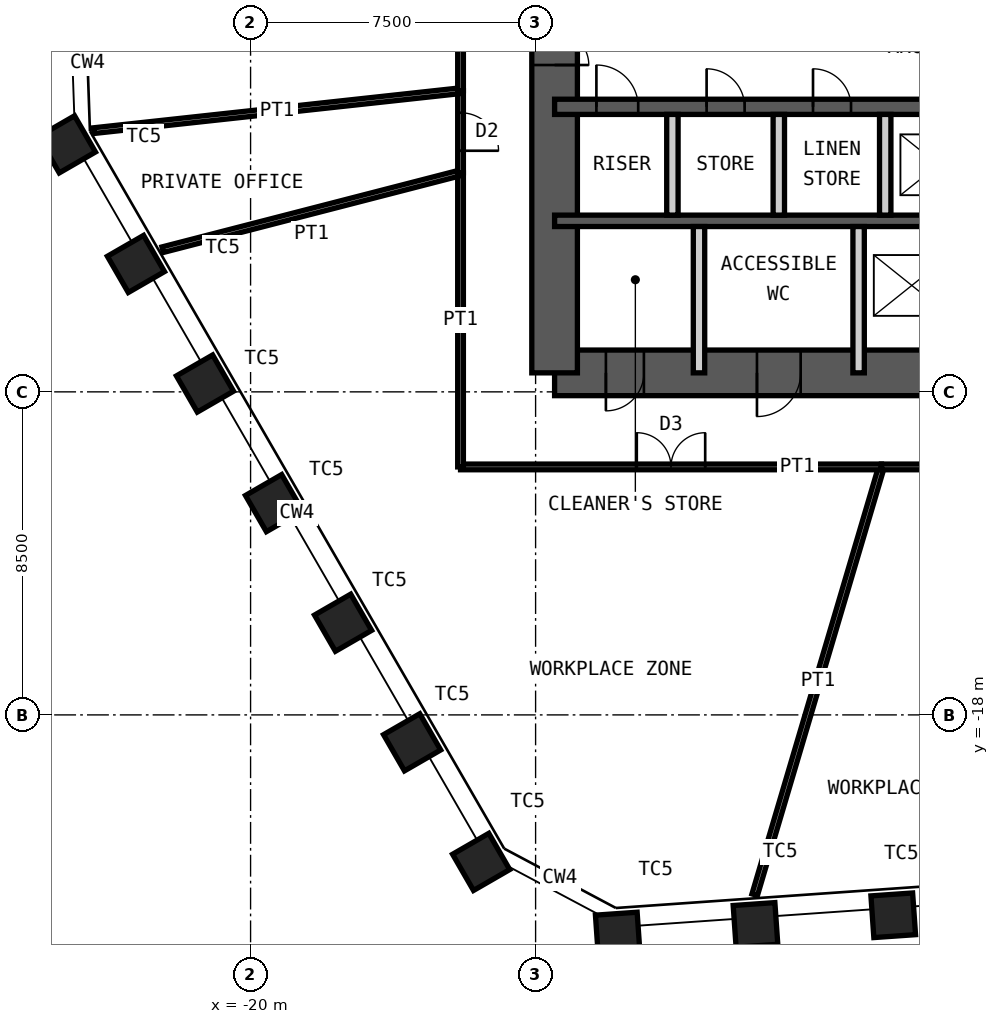
"""IFC4 building model, lengths in metres.
Left out: names, types, materials, properties, quantities, classifications, styles, units other than length and angle.
Written with IfcOpenShell. Run it as: python <this file> out.ifc"""

import sys

from ifc_helpers import new_model, si_unit, direction, frame, frame_2d, origin, origin_2d, place, context, subcontext, project, spatial, rectangle, hollow_rectangle, extrude, element, fill, save


model = new_model("IFC4")
c1 = context("Model", 3, precision=1e-05, world=origin(), true_north=direction((0.0, 1.0)))
c2 = subcontext(c1, "Body", "Model", "MODEL_VIEW")
j1 = project(units=[si_unit("LENGTHUNIT", "METRE"), si_unit("PLANEANGLEUNIT", "RADIAN")], contexts=[c1])
p1 = place(None, origin())
s1 = spatial("IfcSite", under=j1, at=p1, CompositionType="ELEMENT")
p2 = place(p1, origin())
s2 = spatial("IfcBuilding", under=s1, at=p2, CompositionType="ELEMENT")
p3 = place(p2, frame((0.0, 0.0, 209.8)))
s3 = spatial("IfcBuildingStorey", under=s2, at=p3, CompositionType="ELEMENT", Elevation=209.8)
for number, where, z_axis, x_axis in (
    (1, (-3.089, -23.272, 0.0), (0.0, 0.0, 1.0), (0.998, 0.07, 0.0)),
    (2, (-6.714, -23.526, 0.0), (0.0, 0.0, 1.0), (0.998, 0.07, 0.0)),
    (3, (-10.338, -23.779, 0.0), (0.0, 0.0, 1.0), (0.998, 0.07, 0.0)),
    (4, (-13.933, -21.868, 0.0), (0.0, 0.0, 1.0), (0.5, -0.866, 0.0)),
    (5, (-15.749, -18.721, 0.0), (0.0, 0.0, 1.0), (0.5, -0.866, 0.0)),
    (6, (-17.566, -15.574, 0.0), (0.0, 0.0, 1.0), (0.5, -0.866, 0.0)),
    (7, (-19.383, -12.428, 0.0), (0.0, 0.0, 1.0), (0.5, -0.866, 0.0)),
    (8, (-21.2, -9.281, 0.0), (0.0, 0.0, 1.0), (0.5, -0.866, 0.0)),
    (9, (-23.016, -6.134, 0.0), (0.0, 0.0, 1.0), (0.5, -0.866, 0.0)),
    (10, (-24.833, -2.988, 0.0), (0.0, 0.0, 1.0), (0.5, -0.866, 0.0)),
):
    element("IfcColumn", number, at=place(p3, frame(where, z_axis=z_axis, x_axis=x_axis)), inside=s3, PredefinedType="COLUMN", context=c2, shape_type="SweptSolid", body=[
        extrude(hollow_rectangle(XDim=1.1, YDim=1.1, WallThickness=0.07, at=origin_2d()), origin(), (0.0, 0.0, 1.0), 4.2),
    ])
p4 = place(p3, frame((-12.0, -9.0, 0.0), z_axis=(0.0, 0.0, 1.0), x_axis=(1.0, 0.0, 0.0)))
e11 = element("IfcWall", 11, at=p4, inside=s3, PredefinedType="SHEAR", context=c2, shape_type="SweptSolid", body=[
    extrude(rectangle(XDim=24.0, YDim=1.2, at=frame_2d((12.0, 0.0))), origin(), (0.0, 0.0, 1.0), 4.2),
])
p5 = place(p4, frame((1.35, 0.0, 0.0)))
e12 = element("IfcOpeningElement", 12, at=p5, cuts=e11, PredefinedType="OPENING", context=c2, shape_type="SweptSolid", body=[
    extrude(rectangle(XDim=1.0, YDim=2.1, at=frame_2d((0.5, 1.05))), frame((0.0, 0.61, 0.0), z_axis=(0.0, -1.0, 0.0), x_axis=(1.0, 0.0, 0.0)), (0.0, 0.0, 1.0), 1.22),
])
p6 = place(p4, frame((5.325, 0.0, 0.0)))
e13 = element("IfcOpeningElement", 13, at=p6, cuts=e11, PredefinedType="OPENING", context=c2, shape_type="SweptSolid", body=[
    extrude(rectangle(XDim=1.15, YDim=2.1, at=frame_2d((0.575, 1.05))), frame((0.0, 0.61, 0.0), z_axis=(0.0, -1.0, 0.0), x_axis=(1.0, 0.0, 0.0)), (0.0, 0.0, 1.0), 1.22),
])
p7 = place(p4, frame((12.6, 0.0, 0.0)))
e14 = element("IfcOpeningElement", 14, at=p7, cuts=e11, PredefinedType="OPENING", context=c2, shape_type="SweptSolid", body=[
    extrude(rectangle(XDim=1.0, YDim=2.1, at=frame_2d((0.5, 1.05))), frame((0.0, 0.61, 0.0), z_axis=(0.0, -1.0, 0.0), x_axis=(1.0, 0.0, 0.0)), (0.0, 0.0, 1.0), 1.22),
])
p8 = place(p3, frame((-12.0, -9.0, 0.0), z_axis=(0.0, 0.0, 1.0), x_axis=(0.0, 1.0, 0.0)))
e15 = element("IfcWall", 15, at=p8, inside=s3, PredefinedType="SHEAR", context=c2, shape_type="SweptSolid", body=[
    extrude(rectangle(XDim=18.0, YDim=1.2, at=frame_2d((9.0, 0.0))), origin(), (0.0, 0.0, 1.0), 4.2),
])
p9 = place(p8, frame((8.1, 0.0, 0.0)))
e16 = element("IfcOpeningElement", 16, at=p9, cuts=e15, PredefinedType="OPENING", context=c2, shape_type="SweptSolid", body=[
    extrude(rectangle(XDim=1.8, YDim=2.1, at=frame_2d((0.9, 1.05))), frame((0.0, 0.61, 0.0), z_axis=(0.0, -1.0, 0.0), x_axis=(1.0, 0.0, 0.0)), (0.0, 0.0, 1.0), 1.22),
])
p10 = place(p3, frame((-12.0, -2.0, 0.0), z_axis=(0.0, 0.0, 1.0), x_axis=(1.0, 0.0, 0.0)))
e17 = element("IfcWall", 17, at=p10, inside=s3, PredefinedType="SHEAR", context=c2, shape_type="SweptSolid", body=[
    extrude(rectangle(XDim=24.0, YDim=0.4, at=frame_2d((12.0, 0.0))), origin(), (0.0, 0.0, 1.0), 4.2),
])
p11 = place(p10, frame((1.1, 0.0, 0.0)))
e18 = element("IfcOpeningElement", 18, at=p11, cuts=e17, PredefinedType="OPENING", context=c2, shape_type="SweptSolid", body=[
    extrude(rectangle(XDim=1.1, YDim=2.1, at=frame_2d((0.55, 1.05))), frame((0.0, 0.21, 0.0), z_axis=(0.0, -1.0, 0.0), x_axis=(1.0, 0.0, 0.0)), (0.0, 0.0, 1.0), 0.42),
])
p12 = place(p10, frame((13.55, 0.0, 0.0)))
e19 = element("IfcOpeningElement", 19, at=p12, cuts=e17, PredefinedType="OPENING", context=c2, shape_type="SweptSolid", body=[
    extrude(rectangle(XDim=1.1, YDim=2.1, at=frame_2d((0.55, 1.05))), frame((0.0, 0.21, 0.0), z_axis=(0.0, -1.0, 0.0), x_axis=(1.0, 0.0, 0.0)), (0.0, 0.0, 1.0), 0.42),
])
p13 = place(p10, frame((20.7, 0.0, 0.0)))
e20 = element("IfcOpeningElement", 20, at=p13, cuts=e17, PredefinedType="OPENING", context=c2, shape_type="SweptSolid", body=[
    extrude(rectangle(XDim=1.1, YDim=2.1, at=frame_2d((0.55, 1.05))), frame((0.0, 0.21, 0.0), z_axis=(0.0, -1.0, 0.0), x_axis=(1.0, 0.0, 0.0)), (0.0, 0.0, 1.0), 0.42),
])
p14 = place(p10, frame((4.0, 0.0, 0.0)))
e21 = element("IfcOpeningElement", 21, at=p14, cuts=e17, PredefinedType="OPENING", context=c2, shape_type="SweptSolid", body=[
    extrude(rectangle(XDim=1.0, YDim=2.1, at=frame_2d((0.5, 1.05))), frame((0.0, 0.21, 0.0), z_axis=(0.0, -1.0, 0.0), x_axis=(1.0, 0.0, 0.0)), (0.0, 0.0, 1.0), 0.42),
])
p15 = place(p10, frame((6.8, 0.0, 0.0)))
e22 = element("IfcOpeningElement", 22, at=p15, cuts=e17, PredefinedType="OPENING", context=c2, shape_type="SweptSolid", body=[
    extrude(rectangle(XDim=1.0, YDim=2.1, at=frame_2d((0.5, 1.05))), frame((0.0, 0.21, 0.0), z_axis=(0.0, -1.0, 0.0), x_axis=(1.0, 0.0, 0.0)), (0.0, 0.0, 1.0), 0.42),
])
p16 = place(p3, frame((-12.0, -5.0, 0.0), z_axis=(0.0, 0.0, 1.0), x_axis=(1.0, 0.0, 0.0)))
e23 = element("IfcWall", 23, at=p16, inside=s3, PredefinedType="SHEAR", context=c2, shape_type="SweptSolid", body=[
    extrude(rectangle(XDim=24.0, YDim=0.3, at=frame_2d((12.0, 0.0))), origin(), (0.0, 0.0, 1.0), 4.2),
])
for number, where, z_axis, x_axis in (
    (24, (-8.9, -4.85, 0.0), (0.0, 0.0, 1.0), (0.0, 1.0, 0.0)),
    (25, (-6.1, -4.85, 0.0), (0.0, 0.0, 1.0), (0.0, 1.0, 0.0)),
    (26, (-3.3, -4.85, 0.0), (0.0, 0.0, 1.0), (0.0, 1.0, 0.0)),
):
    element("IfcWall", number, at=place(p3, frame(where, z_axis=z_axis, x_axis=x_axis)), inside=s3, PredefinedType="PARTITIONING", context=c2, shape_type="SweptSolid", body=[
        extrude(rectangle(XDim=2.65, YDim=0.3, at=frame_2d((1.325, 0.0))), origin(), (0.0, 0.0, 1.0), 3.98),
    ])
for number, where, z_axis, x_axis in (
    (27, (-8.2, -9.0, 0.0), (0.0, 0.0, 1.0), (0.0, 1.0, 0.0)),
    (28, (-4.0, -9.0, 0.0), (0.0, 0.0, 1.0), (0.0, 1.0, 0.0)),
):
    element("IfcWall", number, at=place(p3, frame(where, z_axis=z_axis, x_axis=x_axis)), inside=s3, PredefinedType="PARTITIONING", context=c2, shape_type="SweptSolid", body=[
        extrude(rectangle(XDim=3.85, YDim=0.3, at=frame_2d((1.925, 0.0))), origin(), (0.0, 0.0, 1.0), 3.98),
    ])
p17 = place(p3, frame((-6.734, -22.731, 0.0), z_axis=(0.0, 0.0, 1.0), x_axis=(0.284049386564, 0.958809650553, 0.0)))
e29 = element("IfcWall", 29, at=p17, inside=s3, PredefinedType="PARTITIONING", context=c2, shape_type="SweptSolid", body=[
    extrude(rectangle(XDim=11.74, YDim=0.15, at=frame_2d((5.87, 0.0))), origin(), (0.0, 0.0, 1.0), 3.33),
])
p18 = place(p3, frame((-3.399, -11.475, 0.0), z_axis=(0.0, 0.0, 1.0), x_axis=(-1.0, 0.0, 0.0)))
e30 = element("IfcWall", 30, at=p18, inside=s3, PredefinedType="PARTITIONING", context=c2, shape_type="SweptSolid", body=[
    extrude(rectangle(XDim=11.076, YDim=0.15, at=frame_2d((5.538, 0.0))), origin(), (0.0, 0.0, 1.0), 4.03),
])
p19 = place(p18, frame((4.638, 0.0, 0.0)))
e31 = element("IfcOpeningElement", 31, at=p19, cuts=e30, PredefinedType="OPENING", context=c2, shape_type="SweptSolid", body=[
    extrude(rectangle(XDim=1.8, YDim=2.4, at=frame_2d((0.9, 1.2))), frame((0.0, 0.085, 0.0), z_axis=(0.0, -1.0, 0.0), x_axis=(1.0, 0.0, 0.0)), (0.0, 0.0, 1.0), 0.17),
])
p20 = place(p3, frame((-14.475, -11.475, 0.0), z_axis=(0.0, 0.0, 1.0), x_axis=(0.0, 1.0, 0.0)))
e32 = element("IfcWall", 32, at=p20, inside=s3, PredefinedType="PARTITIONING", context=c2, shape_type="SweptSolid", body=[
    extrude(rectangle(XDim=7.739, YDim=0.15, at=frame_2d((3.87, 0.0))), origin(), (0.0, 0.0, 1.0), 4.03),
])
p21 = place(p3, frame((-22.313, -5.759, 0.0), z_axis=(0.0, 0.0, 1.0), x_axis=(0.968265788926, 0.249922712042, 0.0)))
e33 = element("IfcWall", 33, at=p21, inside=s3, PredefinedType="PARTITIONING", context=c2, shape_type="SweptSolid", body=[
    extrude(rectangle(XDim=8.095, YDim=0.15, at=frame_2d((4.048, 0.0))), origin(), (0.0, 0.0, 1.0), 3.43),
])
p22 = place(p3, frame((-14.475, -3.736, 0.0), z_axis=(0.0, 0.0, 1.0), x_axis=(0.0, 1.0, 0.0)))
e34 = element("IfcWall", 34, at=p22, inside=s3, PredefinedType="PARTITIONING", context=c2, shape_type="SweptSolid", body=[
    extrude(rectangle(XDim=2.16, YDim=0.15, at=frame_2d((1.08, 0.0))), origin(), (0.0, 0.0, 1.0), 4.03),
])
p23 = place(p22, frame((0.58, 0.0, 0.0)))
e35 = element("IfcOpeningElement", 35, at=p23, cuts=e34, PredefinedType="OPENING", context=c2, shape_type="SweptSolid", body=[
    extrude(rectangle(XDim=1.0, YDim=2.4, at=frame_2d((0.5, 1.2))), frame((0.0, 0.085, 0.0), z_axis=(0.0, -1.0, 0.0), x_axis=(1.0, 0.0, 0.0)), (0.0, 0.0, 1.0), 0.17),
])
p24 = place(p3, frame((-24.128, -2.627, 0.0), z_axis=(0.0, 0.0, 1.0), x_axis=(0.994126892449, 0.108220708326, 0.0)))
e36 = element("IfcWall", 36, at=p24, inside=s3, PredefinedType="PARTITIONING", context=c2, shape_type="SweptSolid", body=[
    extrude(rectangle(XDim=9.71, YDim=0.15, at=frame_2d((4.855, 0.0))), origin(), (0.0, 0.0, 1.0), 2.93),
])
p25 = place(p3, frame((-14.475, -1.576, 0.0), z_axis=(0.0, 0.0, 1.0), x_axis=(0.0, 1.0, 0.0)))
e37 = element("IfcWall", 37, at=p25, inside=s3, PredefinedType="PARTITIONING", context=c2, shape_type="SweptSolid", body=[
    extrude(rectangle(XDim=4.252, YDim=0.15, at=frame_2d((2.126, 0.0))), origin(), (0.0, 0.0, 1.0), 4.03),
])
p26 = place(p25, frame((1.626, 0.0, 0.0)))
e38 = element("IfcOpeningElement", 38, at=p26, cuts=e37, PredefinedType="OPENING", context=c2, shape_type="SweptSolid", body=[
    extrude(rectangle(XDim=1.0, YDim=2.4, at=frame_2d((0.5, 1.2))), frame((0.0, 0.085, 0.0), z_axis=(0.0, -1.0, 0.0), x_axis=(1.0, 0.0, 0.0)), (0.0, 0.0, 1.0), 0.17),
])
p27 = place(p3, frame((0.25, -11.475, 0.0), z_axis=(0.0, 0.0, 1.0), x_axis=(-1.0, 0.0, 0.0)))
e39 = element("IfcWall", 39, at=p27, inside=s3, PredefinedType="PARTITIONING", context=c2, shape_type="SweptSolid", body=[
    extrude(rectangle(XDim=3.65, YDim=0.15, at=frame_2d((1.825, 0.0))), origin(), (0.0, 0.0, 1.0), 4.03),
])
p28 = place(p27, frame((1.325, 0.0, 0.0)))
e40 = element("IfcOpeningElement", 40, at=p28, cuts=e39, PredefinedType="OPENING", context=c2, shape_type="SweptSolid", body=[
    extrude(rectangle(XDim=1.0, YDim=2.4, at=frame_2d((0.5, 1.2))), frame((0.0, 0.085, 0.0), z_axis=(0.0, -1.0, 0.0), x_axis=(1.0, 0.0, 0.0)), (0.0, 0.0, 1.0), 0.17),
])
p29 = place(p5, origin())
e41 = element("IfcDoor", 41, at=p29, inside=s3, OperationType="SINGLE_SWING_LEFT", PredefinedType="DOOR", context=c2, shape_type="SweptSolid", body=[
    extrude(rectangle(XDim=1.0, YDim=2.1, at=frame_2d((0.5, 1.05))), frame((0.0, 0.025, 0.0), z_axis=(0.0, -1.0, 0.0), x_axis=(1.0, 0.0, 0.0)), (0.0, 0.0, 1.0), 0.05),
])
fill(e12, e41)
p30 = place(p6, origin())
e42 = element("IfcDoor", 42, at=p30, inside=s3, OperationType="SINGLE_SWING_LEFT", PredefinedType="DOOR", context=c2, shape_type="SweptSolid", body=[
    extrude(rectangle(XDim=1.15, YDim=2.1, at=frame_2d((0.575, 1.05))), frame((0.0, 0.025, 0.0), z_axis=(0.0, -1.0, 0.0), x_axis=(1.0, 0.0, 0.0)), (0.0, 0.0, 1.0), 0.05),
])
fill(e13, e42)
p31 = place(p11, origin())
e43 = element("IfcDoor", 43, at=p31, inside=s3, OperationType="SINGLE_SWING_RIGHT", PredefinedType="DOOR", context=c2, shape_type="SweptSolid", body=[
    extrude(rectangle(XDim=1.1, YDim=2.1, at=frame_2d((0.55, 1.05))), frame((0.0, 0.025, 0.0), z_axis=(0.0, -1.0, 0.0), x_axis=(1.0, 0.0, 0.0)), (0.0, 0.0, 1.0), 0.05),
])
fill(e18, e43)
p32 = place(p9, origin())
e44 = element("IfcDoor", 44, at=p32, inside=s3, OperationType="DOUBLE_DOOR_DOUBLE_SWING", PredefinedType="DOOR", context=c2, shape_type="SweptSolid", body=[
    extrude(rectangle(XDim=1.8, YDim=2.1, at=frame_2d((0.9, 1.05))), frame((0.0, 0.025, 0.0), z_axis=(0.0, -1.0, 0.0), x_axis=(1.0, 0.0, 0.0)), (0.0, 0.0, 1.0), 0.05),
])
fill(e16, e44)
p33 = place(p14, origin())
e45 = element("IfcDoor", 45, at=p33, inside=s3, OperationType="SINGLE_SWING_RIGHT", PredefinedType="DOOR", context=c2, shape_type="SweptSolid", body=[
    extrude(rectangle(XDim=1.0, YDim=2.1, at=frame_2d((0.5, 1.05))), frame((0.0, 0.025, 0.0), z_axis=(0.0, -1.0, 0.0), x_axis=(1.0, 0.0, 0.0)), (0.0, 0.0, 1.0), 0.05),
])
fill(e21, e45)
p34 = place(p15, origin())
e46 = element("IfcDoor", 46, at=p34, inside=s3, OperationType="SINGLE_SWING_RIGHT", PredefinedType="DOOR", context=c2, shape_type="SweptSolid", body=[
    extrude(rectangle(XDim=1.0, YDim=2.1, at=frame_2d((0.5, 1.05))), frame((0.0, 0.025, 0.0), z_axis=(0.0, -1.0, 0.0), x_axis=(1.0, 0.0, 0.0)), (0.0, 0.0, 1.0), 0.05),
])
fill(e22, e46)
p35 = place(p19, origin())
e47 = element("IfcDoor", 47, at=p35, inside=s3, OperationType="DOUBLE_DOOR_DOUBLE_SWING", PredefinedType="DOOR", context=c2, shape_type="SweptSolid", body=[
    extrude(rectangle(XDim=1.8, YDim=2.4, at=frame_2d((0.9, 1.2))), frame((0.0, 0.025, 0.0), z_axis=(0.0, -1.0, 0.0), x_axis=(1.0, 0.0, 0.0)), (0.0, 0.0, 1.0), 0.05),
])
fill(e31, e47)
p36 = place(p23, origin())
e48 = element("IfcDoor", 48, at=p36, inside=s3, OperationType="SINGLE_SWING_LEFT", PredefinedType="DOOR", context=c2, shape_type="SweptSolid", body=[
    extrude(rectangle(XDim=1.0, YDim=2.4, at=frame_2d((0.5, 1.2))), frame((0.0, 0.025, 0.0), z_axis=(0.0, -1.0, 0.0), x_axis=(1.0, 0.0, 0.0)), (0.0, 0.0, 1.0), 0.05),
])
fill(e35, e48)
save(model, sys.argv[1])
